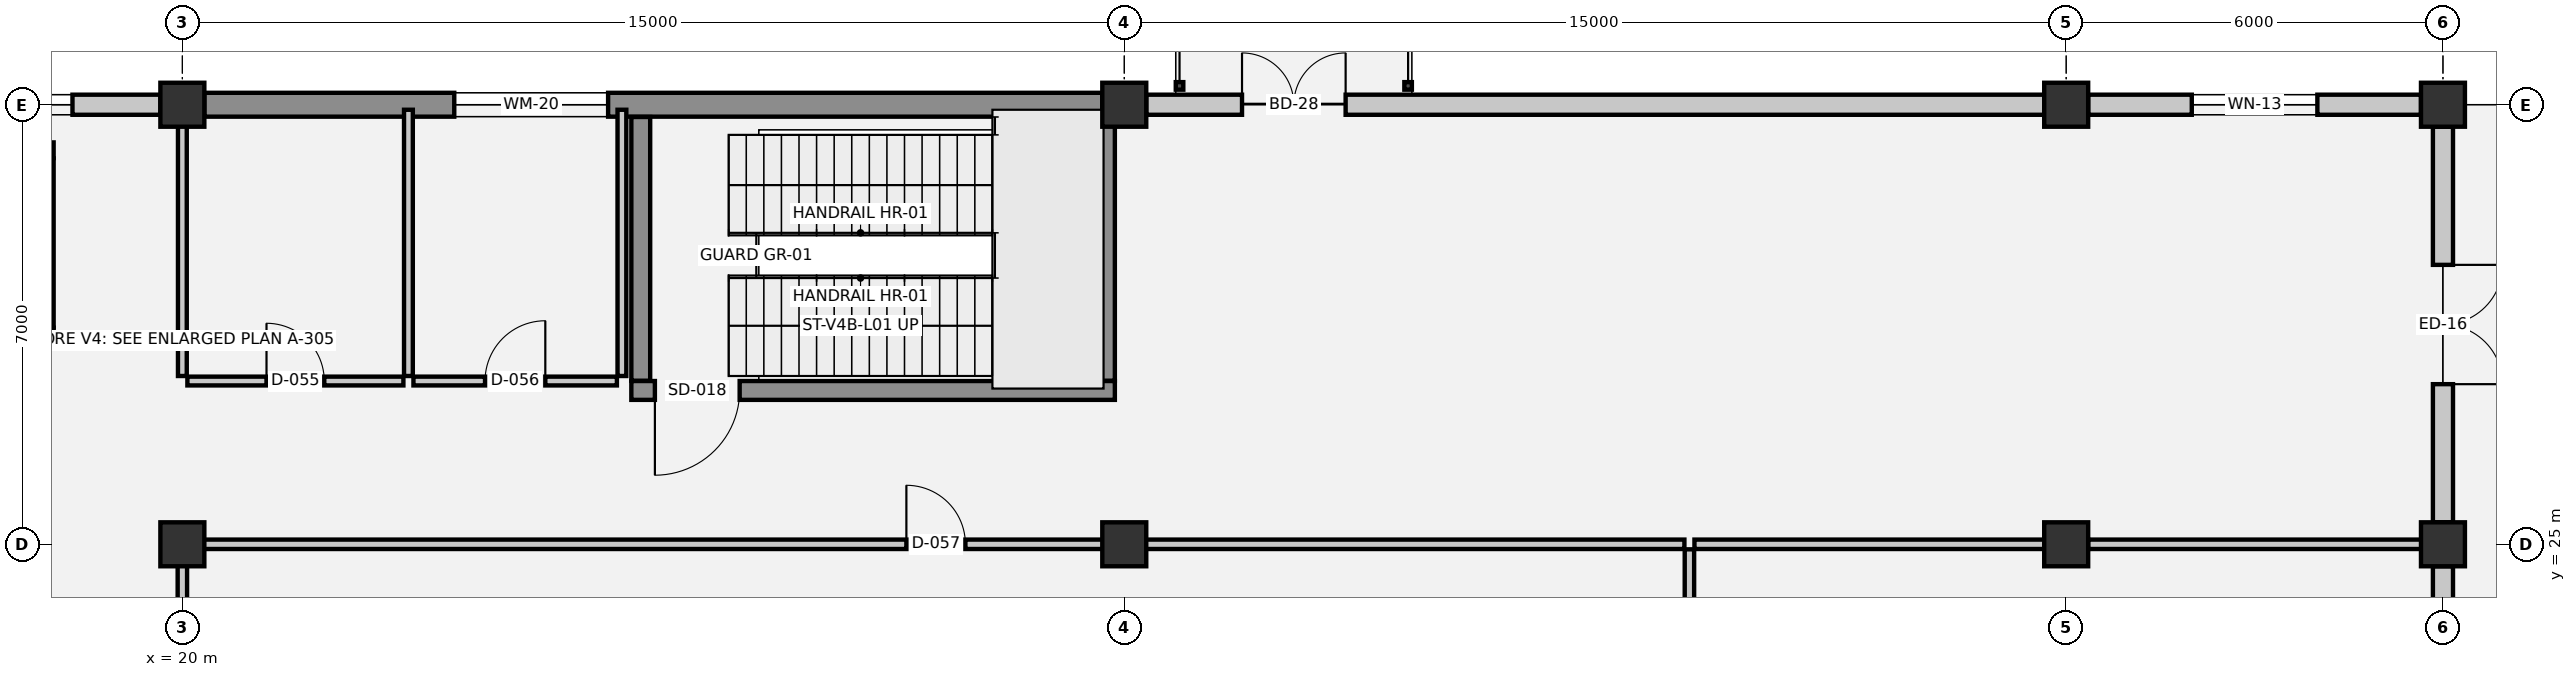
"""IFC4 building model, lengths in metres.
Left out: names, types, materials, properties, quantities, classifications, styles, units other than length and angle.
Written with IfcOpenShell. Run it as: python <this file> out.ifc"""

import sys

from ifc_helpers import new_model, si_unit, direction, frame, frame_2d, origin, origin_2d, place, context, subcontext, project, spatial, rectangle, extrude, element, fill, save


model = new_model("IFC4")
c1 = context("Model", 3, precision=1e-05, world=origin(), true_north=direction((0.0, 1.0)))
c2 = subcontext(c1, "Body", "Model", "MODEL_VIEW")
j1 = project(units=[si_unit("LENGTHUNIT", "METRE"), si_unit("PLANEANGLEUNIT", "RADIAN")], contexts=[c1])
p1 = place(None, origin())
s1 = spatial("IfcSite", under=j1, at=p1, CompositionType="ELEMENT")
p2 = place(p1, origin())
s2 = spatial("IfcBuilding", under=s1, at=p2, CompositionType="ELEMENT")
p3 = place(p2, origin())
s3 = spatial("IfcBuildingStorey", under=s2, at=p3, CompositionType="ELEMENT", Elevation=0.0)
for number, where, z_axis, x_axis in (
    (1, (20.0, 25.0, 0.0), (0.0, 0.0, 1.0), (1.0, 0.0, 0.0)),
    (2, (20.0, 32.0, 0.0), (0.0, 0.0, 1.0), (1.0, 0.0, 0.0)),
    (3, (35.0, 25.0, 0.0), (0.0, 0.0, 1.0), (1.0, 0.0, 0.0)),
    (4, (35.0, 32.0, 0.0), (0.0, 0.0, 1.0), (1.0, 0.0, 0.0)),
    (5, (50.0, 25.0, 0.0), (0.0, 0.0, 1.0), (1.0, 0.0, 0.0)),
    (6, (50.0, 32.0, 0.0), (0.0, 0.0, 1.0), (1.0, 0.0, 0.0)),
    (7, (56.0, 25.0, 0.0), (0.0, 0.0, 1.0), (1.0, 0.0, 0.0)),
    (8, (56.0, 32.0, 0.0), (0.0, 0.0, 1.0), (1.0, 0.0, 0.0)),
):
    element("IfcColumn", number, at=place(p3, frame(where, z_axis=z_axis, x_axis=x_axis)), inside=s3, PredefinedType="COLUMN", context=c2, shape_type="SweptSolid", body=[
        extrude(rectangle(XDim=0.7, YDim=0.7, at=origin_2d()), origin(), (0.0, 0.0, 1.0), 5.4),
    ])
p4 = place(p3, frame((14.85, 32.0, 0.0), z_axis=(0.0, 0.0, 1.0), x_axis=(1.0, 0.0, 0.0)))
e9 = element("IfcWall", 9, at=p4, inside=s3, PredefinedType="SOLIDWALL", context=c2, shape_type="SweptSolid", body=[
    extrude(rectangle(XDim=4.8, YDim=0.32, at=frame_2d((2.4, 0.0))), origin(), (0.0, 0.0, 1.0), 4.16),
])
p5 = place(p4, frame((1.4, 0.0, 0.9)))
e10 = element("IfcOpeningElement", 10, at=p5, cuts=e9, PredefinedType="OPENING", context=c2, shape_type="SweptSolid", body=[
    extrude(rectangle(XDim=2.0, YDim=2.2, at=frame_2d((1.0, 1.1))), frame((0.0, 0.17, 0.0), z_axis=(0.0, -1.0, 0.0), x_axis=(1.0, 0.0, 0.0)), (0.0, 0.0, 1.0), 0.34),
])
p6 = place(p3, frame((20.35, 32.0, 0.0), z_axis=(0.0, 0.0, 1.0), x_axis=(1.0, 0.0, 0.0)))
e11 = element("IfcWall", 11, at=p6, inside=s3, PredefinedType="STANDARD", context=c2, shape_type="SweptSolid", body=[
    extrude(rectangle(XDim=14.3, YDim=0.38, at=frame_2d((7.15, 0.0))), origin(), (0.0, 0.0, 1.0), 4.16),
])
p7 = place(p6, frame((3.98, 0.0, 0.95)))
e12 = element("IfcOpeningElement", 12, at=p7, cuts=e11, PredefinedType="OPENING", context=c2, shape_type="SweptSolid", body=[
    extrude(rectangle(XDim=2.45, YDim=1.95, at=frame_2d((1.225, 0.975))), frame((0.0, 0.2, 0.0), z_axis=(0.0, -1.0, 0.0), x_axis=(1.0, 0.0, 0.0)), (0.0, 0.0, 1.0), 0.4),
])
p8 = place(p3, frame((35.35, 32.0, 0.0), z_axis=(0.0, 0.0, 1.0), x_axis=(1.0, 0.0, 0.0)))
e13 = element("IfcWall", 13, at=p8, inside=s3, PredefinedType="SOLIDWALL", context=c2, shape_type="SweptSolid", body=[
    extrude(rectangle(XDim=14.3, YDim=0.32, at=frame_2d((7.15, 0.0))), origin(), (0.0, 0.0, 1.0), 4.16),
])
p9 = place(p8, frame((1.525, 0.0, 0.0)))
e14 = element("IfcOpeningElement", 14, at=p9, cuts=e13, PredefinedType="OPENING", context=c2, shape_type="SweptSolid", body=[
    extrude(rectangle(XDim=1.65, YDim=2.2, at=frame_2d((0.825, 1.1))), frame((0.0, 0.17, 0.0), z_axis=(0.0, -1.0, 0.0), x_axis=(1.0, 0.0, 0.0)), (0.0, 0.0, 1.0), 0.34),
])
p10 = place(p3, frame((50.35, 32.0, 0.0), z_axis=(0.0, 0.0, 1.0), x_axis=(1.0, 0.0, 0.0)))
e15 = element("IfcWall", 15, at=p10, inside=s3, PredefinedType="SOLIDWALL", context=c2, shape_type="SweptSolid", body=[
    extrude(rectangle(XDim=5.3, YDim=0.32, at=frame_2d((2.65, 0.0))), origin(), (0.0, 0.0, 1.0), 4.16),
])
p11 = place(p10, frame((1.65, 0.0, 0.9)))
e16 = element("IfcOpeningElement", 16, at=p11, cuts=e15, PredefinedType="OPENING", context=c2, shape_type="SweptSolid", body=[
    extrude(rectangle(XDim=2.0, YDim=2.2, at=frame_2d((1.0, 1.1))), frame((0.0, 0.17, 0.0), z_axis=(0.0, -1.0, 0.0), x_axis=(1.0, 0.0, 0.0)), (0.0, 0.0, 1.0), 0.34),
])
p12 = place(p3, frame((56.0, 31.65, 0.0), z_axis=(0.0, 0.0, 1.0), x_axis=(0.0, -1.0, 0.0)))
e17 = element("IfcWall", 17, at=p12, inside=s3, PredefinedType="SOLIDWALL", context=c2, shape_type="SweptSolid", body=[
    extrude(rectangle(XDim=6.3, YDim=0.32, at=frame_2d((3.15, 0.0))), origin(), (0.0, 0.0, 1.0), 4.16),
])
p13 = place(p12, frame((2.2, 0.0, 0.0)))
e18 = element("IfcOpeningElement", 18, at=p13, cuts=e17, PredefinedType="OPENING", context=c2, shape_type="SweptSolid", body=[
    extrude(rectangle(XDim=1.9, YDim=2.25, at=frame_2d((0.95, 1.125))), frame((0.0, 0.17, 0.0), z_axis=(0.0, -1.0, 0.0), x_axis=(1.0, 0.0, 0.0)), (0.0, 0.0, 1.0), 0.34),
])
p14 = place(p3, frame((56.0, 24.65, 0.0), z_axis=(0.0, 0.0, 1.0), x_axis=(0.0, -1.0, 0.0)))
e19 = element("IfcWall", 19, at=p14, inside=s3, PredefinedType="SOLIDWALL", context=c2, shape_type="SweptSolid", body=[
    extrude(rectangle(XDim=7.3, YDim=0.32, at=frame_2d((3.65, 0.0))), origin(), (0.0, 0.0, 1.0), 4.16),
])
p15 = place(p14, frame((2.45, 0.0, 0.0)))
e20 = element("IfcOpeningElement", 20, at=p15, cuts=e19, PredefinedType="OPENING", context=c2, shape_type="SweptSolid", body=[
    extrude(rectangle(XDim=2.4, YDim=2.4, at=frame_2d((1.2, 1.2))), frame((0.0, 0.17, 0.0), z_axis=(0.0, -1.0, 0.0), x_axis=(1.0, 0.0, 0.0)), (0.0, 0.0, 1.0), 0.34),
])
p16 = place(p3, frame((15.05, 28.325, 0.0), z_axis=(0.0, 0.0, 1.0), x_axis=(1.0, 0.0, 0.0)))
e21 = element("IfcWall", 21, at=p16, inside=s3, PredefinedType="SHEAR", context=c2, shape_type="SweptSolid", body=[
    extrude(rectangle(XDim=2.9, YDim=0.25, at=frame_2d((1.45, 0.0))), origin(), (0.0, 0.0, 1.0), 5.4),
])
p17 = place(p16, frame((0.9, 0.0, 0.0)))
e22 = element("IfcOpeningElement", 22, at=p17, cuts=e21, PredefinedType="OPENING", context=c2, shape_type="SweptSolid", body=[
    extrude(rectangle(XDim=1.1, YDim=2.15, at=frame_2d((0.55, 1.075))), frame((0.0, 0.135, 0.0), z_axis=(0.0, -1.0, 0.0), x_axis=(1.0, 0.0, 0.0)), (0.0, 0.0, 1.0), 0.27),
])
p18 = place(p3, frame((17.95, 31.275, 0.0), z_axis=(0.0, 0.0, 1.0), x_axis=(-1.0, 0.0, 0.0)))
e23 = element("IfcWall", 23, at=p18, inside=s3, PredefinedType="SHEAR", context=c2, shape_type="SweptSolid", body=[
    extrude(rectangle(XDim=2.9, YDim=0.25, at=frame_2d((1.45, 0.0))), origin(), (0.0, 0.0, 1.0), 5.4),
])
p19 = place(p3, frame((17.825, 28.455, 0.0), z_axis=(0.0, 0.0, 1.0), x_axis=(0.0, 1.0, 0.0)))
e24 = element("IfcWall", 24, at=p19, inside=s3, PredefinedType="SHEAR", context=c2, shape_type="SweptSolid", body=[
    extrude(rectangle(XDim=2.69, YDim=0.25, at=frame_2d((1.345, 0.0))), origin(), (0.0, 0.0, 1.0), 5.4),
])
p20 = place(p3, frame((34.85, 27.45, 0.0), z_axis=(0.0, 0.0, 1.0), x_axis=(-1.0, 0.0, 0.0)))
e25 = element("IfcWall", 25, at=p20, inside=s3, PredefinedType="SHEAR", context=c2, shape_type="SweptSolid", body=[
    extrude(rectangle(XDim=7.7, YDim=0.3, at=frame_2d((3.85, 0.0))), origin(), (0.0, 0.0, 1.0), 5.14),
])
p21 = place(p20, frame((5.975, 0.0, 0.0)))
e26 = element("IfcOpeningElement", 26, at=p21, cuts=e25, PredefinedType="OPENING", context=c2, shape_type="SweptSolid", body=[
    extrude(rectangle(XDim=1.35, YDim=2.2, at=frame_2d((0.675, 1.1))), frame((0.0, 0.16, 0.0), z_axis=(0.0, -1.0, 0.0), x_axis=(1.0, 0.0, 0.0)), (0.0, 0.0, 1.0), 0.32),
])
for number, where, z_axis, x_axis in (
    (27, (27.3, 31.805, 0.0), (0.0, 0.0, 1.0), (0.0, -1.0, 0.0)),
    (28, (34.7, 27.605, 0.0), (0.0, 0.0, 1.0), (0.0, 1.0, 0.0)),
):
    element("IfcWall", number, at=place(p3, frame(where, z_axis=z_axis, x_axis=x_axis)), inside=s3, PredefinedType="SHEAR", context=c2, shape_type="SweptSolid", body=[
        extrude(rectangle(XDim=4.2, YDim=0.3, at=frame_2d((2.1, 0.0))), origin(), (0.0, 0.0, 1.0), 5.14),
    ])
p22 = place(p3, frame((20.08, 25.0, 0.0), z_axis=(0.0, 0.0, 1.0), x_axis=(1.0, 0.0, 0.0)))
e29 = element("IfcWall", 29, at=p22, inside=s3, PredefinedType="PARTITIONING", context=c2, shape_type="SweptSolid", body=[
    extrude(rectangle(XDim=23.84, YDim=0.15, at=frame_2d((11.92, 0.0))), origin(), (0.0, 0.0, 1.0), 4.18),
])
p23 = place(p22, frame((11.45, 0.0, 0.0)))
e30 = element("IfcOpeningElement", 30, at=p23, cuts=e29, PredefinedType="OPENING", context=c2, shape_type="SweptSolid", body=[
    extrude(rectangle(XDim=0.94, YDim=2.15, at=frame_2d((0.47, 1.075))), frame((0.0, 0.085, 0.0), z_axis=(0.0, -1.0, 0.0), x_axis=(1.0, 0.0, 0.0)), (0.0, 0.0, 1.0), 0.17),
])
p24 = place(p3, frame((44.08, 25.0, 0.0), z_axis=(0.0, 0.0, 1.0), x_axis=(1.0, 0.0, 0.0)))
e31 = element("IfcWall", 31, at=p24, inside=s3, PredefinedType="PARTITIONING", context=c2, shape_type="SweptSolid", body=[
    extrude(rectangle(XDim=6.27, YDim=0.15, at=frame_2d((3.135, 0.0))), origin(), (0.0, 0.0, 1.0), 4.18),
])
p25 = place(p3, frame((50.35, 25.0, 0.0), z_axis=(0.0, 0.0, 1.0), x_axis=(1.0, 0.0, 0.0)))
e32 = element("IfcWall", 32, at=p25, inside=s3, PredefinedType="PARTITIONING", context=c2, shape_type="SweptSolid", body=[
    extrude(rectangle(XDim=5.57, YDim=0.15, at=frame_2d((2.785, 0.0))), origin(), (0.0, 0.0, 1.0), 4.43),
])
p26 = place(p3, frame((20.08, 27.6, 0.0), z_axis=(0.0, 0.0, 1.0), x_axis=(1.0, 0.0, 0.0)))
e33 = element("IfcWall", 33, at=p26, inside=s3, PredefinedType="PLUMBINGWALL", context=c2, shape_type="SweptSolid", body=[
    extrude(rectangle(XDim=3.44, YDim=0.14, at=frame_2d((1.72, 0.0))), origin(), (0.0, 0.0, 1.0), 5.04),
])
p27 = place(p26, frame((1.26, 0.0, 0.0)))
e34 = element("IfcOpeningElement", 34, at=p27, cuts=e33, PredefinedType="OPENING", context=c2, shape_type="SweptSolid", body=[
    extrude(rectangle(XDim=0.92, YDim=2.1, at=frame_2d((0.46, 1.05))), frame((0.0, 0.08, 0.0), z_axis=(0.0, -1.0, 0.0), x_axis=(1.0, 0.0, 0.0)), (0.0, 0.0, 1.0), 0.16),
])
p28 = place(p3, frame((23.68, 27.6, 0.0), z_axis=(0.0, 0.0, 1.0), x_axis=(1.0, 0.0, 0.0)))
e35 = element("IfcWall", 35, at=p28, inside=s3, PredefinedType="PLUMBINGWALL", context=c2, shape_type="SweptSolid", body=[
    extrude(rectangle(XDim=3.24, YDim=0.14, at=frame_2d((1.62, 0.0))), origin(), (0.0, 0.0, 1.0), 5.04),
])
p29 = place(p28, frame((1.14, 0.0, 0.0)))
e36 = element("IfcOpeningElement", 36, at=p29, cuts=e35, PredefinedType="OPENING", context=c2, shape_type="SweptSolid", body=[
    extrude(rectangle(XDim=0.96, YDim=2.1, at=frame_2d((0.48, 1.05))), frame((0.0, 0.08, 0.0), z_axis=(0.0, -1.0, 0.0), x_axis=(1.0, 0.0, 0.0)), (0.0, 0.0, 1.0), 0.16),
])
p30 = place(p3, frame((20.0, 16.65, 0.0), z_axis=(0.0, 0.0, 1.0), x_axis=(0.0, 1.0, 0.0)))
e37 = element("IfcWall", 37, at=p30, inside=s3, PredefinedType="PARTITIONING", context=c2, shape_type="SweptSolid", body=[
    extrude(rectangle(XDim=8.27, YDim=0.15, at=frame_2d((4.135, 0.0))), origin(), (0.0, 0.0, 1.0), 4.43),
])
p31 = place(p3, frame((20.0, 27.68, 0.0), z_axis=(0.0, 0.0, 1.0), x_axis=(0.0, 1.0, 0.0)))
e38 = element("IfcWall", 38, at=p31, inside=s3, PredefinedType="PLUMBINGWALL", context=c2, shape_type="SweptSolid", body=[
    extrude(rectangle(XDim=4.24, YDim=0.14, at=frame_2d((2.12, 0.0))), origin(), (0.0, 0.0, 1.0), 4.58),
])
for number, where, z_axis, x_axis in (
    (39, (23.6, 27.68, 0.0), (0.0, 0.0, 1.0), (0.0, 1.0, 0.0)),
    (40, (27.0, 27.68, 0.0), (0.0, 0.0, 1.0), (0.0, 1.0, 0.0)),
):
    element("IfcWall", number, at=place(p3, frame(where, z_axis=z_axis, x_axis=x_axis)), inside=s3, PredefinedType="PLUMBINGWALL", context=c2, shape_type="SweptSolid", body=[
        extrude(rectangle(XDim=4.24, YDim=0.14, at=frame_2d((2.12, 0.0))), origin(), (0.0, 0.0, 1.0), 5.04),
    ])
p32 = place(p3, frame((44.0, 10.08, 0.0), z_axis=(0.0, 0.0, 1.0), x_axis=(0.0, 1.0, 0.0)))
e41 = element("IfcWall", 41, at=p32, inside=s3, PredefinedType="PARTITIONING", context=c2, shape_type="SweptSolid", body=[
    extrude(rectangle(XDim=14.84, YDim=0.15, at=frame_2d((7.42, 0.0))), origin(), (0.0, 0.0, 1.0), 5.04),
])
p33 = place(p32, frame((6.91, 0.0, 0.0)))
e42 = element("IfcOpeningElement", 42, at=p33, cuts=e41, PredefinedType="OPENING", context=c2, shape_type="SweptSolid", body=[
    extrude(rectangle(XDim=1.02, YDim=2.15, at=frame_2d((0.51, 1.075))), frame((0.0, 0.085, 0.0), z_axis=(0.0, -1.0, 0.0), x_axis=(1.0, 0.0, 0.0)), (0.0, 0.0, 1.0), 0.17),
])
p34 = place(p5, origin())
e43 = element("IfcWindow", 43, at=p34, inside=s3, PartitioningType="SINGLE_PANEL", PredefinedType="WINDOW", context=c2, shape_type="SweptSolid", body=[
    extrude(rectangle(XDim=2.0, YDim=2.2, at=frame_2d((1.0, 1.1))), frame((0.0, 0.03, 0.0), z_axis=(0.0, -1.0, 0.0), x_axis=(1.0, 0.0, 0.0)), (0.0, 0.0, 1.0), 0.06),
])
fill(e10, e43)
p35 = place(p9, origin())
e44 = element("IfcDoor", 44, at=p35, inside=s3, OperationType="DOUBLE_DOOR_SINGLE_SWING", PredefinedType="DOOR", context=c2, shape_type="SweptSolid", body=[
    extrude(rectangle(XDim=1.65, YDim=2.2, at=frame_2d((0.825, 1.1))), frame((0.0, 0.025, 0.0), z_axis=(0.0, -1.0, 0.0), x_axis=(1.0, 0.0, 0.0)), (0.0, 0.0, 1.0), 0.05),
])
fill(e14, e44)
p36 = place(p11, origin())
e45 = element("IfcWindow", 45, at=p36, inside=s3, PartitioningType="SINGLE_PANEL", PredefinedType="WINDOW", context=c2, shape_type="SweptSolid", body=[
    extrude(rectangle(XDim=2.0, YDim=2.2, at=frame_2d((1.0, 1.1))), frame((0.0, 0.03, 0.0), z_axis=(0.0, -1.0, 0.0), x_axis=(1.0, 0.0, 0.0)), (0.0, 0.0, 1.0), 0.06),
])
fill(e16, e45)
p37 = place(p13, origin())
e46 = element("IfcDoor", 46, at=p37, inside=s3, OperationType="DOUBLE_DOOR_SINGLE_SWING", PredefinedType="DOOR", context=c2, shape_type="SweptSolid", body=[
    extrude(rectangle(XDim=1.9, YDim=2.25, at=frame_2d((0.95, 1.125))), frame((0.0, 0.025, 0.0), z_axis=(0.0, -1.0, 0.0), x_axis=(1.0, 0.0, 0.0)), (0.0, 0.0, 1.0), 0.05),
])
fill(e18, e46)
p38 = place(p21, origin())
e47 = element("IfcDoor", 47, at=p38, inside=s3, OperationType="SINGLE_SWING_RIGHT", PredefinedType="DOOR", context=c2, shape_type="SweptSolid", body=[
    extrude(rectangle(XDim=1.35, YDim=2.2, at=frame_2d((0.675, 1.1))), frame((0.0, 0.025, 0.0), z_axis=(0.0, -1.0, 0.0), x_axis=(1.0, 0.0, 0.0)), (0.0, 0.0, 1.0), 0.05),
])
fill(e26, e47)
p39 = place(p27, origin())
e48 = element("IfcDoor", 48, at=p39, inside=s3, OperationType="SINGLE_SWING_LEFT", PredefinedType="DOOR", context=c2, shape_type="SweptSolid", body=[
    extrude(rectangle(XDim=0.92, YDim=2.1, at=frame_2d((0.46, 1.05))), frame((0.0, 0.025, 0.0), z_axis=(0.0, -1.0, 0.0), x_axis=(1.0, 0.0, 0.0)), (0.0, 0.0, 1.0), 0.05),
])
fill(e34, e48)
p40 = place(p29, origin())
e49 = element("IfcDoor", 49, at=p40, inside=s3, OperationType="SINGLE_SWING_RIGHT", PredefinedType="DOOR", context=c2, shape_type="SweptSolid", body=[
    extrude(rectangle(XDim=0.96, YDim=2.1, at=frame_2d((0.48, 1.05))), frame((0.0, 0.025, 0.0), z_axis=(0.0, -1.0, 0.0), x_axis=(1.0, 0.0, 0.0)), (0.0, 0.0, 1.0), 0.05),
])
fill(e36, e49)
p41 = place(p23, origin())
e50 = element("IfcDoor", 50, at=p41, inside=s3, OperationType="SINGLE_SWING_LEFT", PredefinedType="DOOR", context=c2, shape_type="SweptSolid", body=[
    extrude(rectangle(XDim=0.94, YDim=2.15, at=frame_2d((0.47, 1.075))), frame((0.0, 0.025, 0.0), z_axis=(0.0, -1.0, 0.0), x_axis=(1.0, 0.0, 0.0)), (0.0, 0.0, 1.0), 0.05),
])
fill(e30, e50)
p42 = place(p7, origin())
e51 = element("IfcWindow", 51, at=p42, inside=s3, PartitioningType="SINGLE_PANEL", PredefinedType="WINDOW", context=c2, shape_type="SweptSolid", body=[
    extrude(rectangle(XDim=2.45, YDim=1.95, at=frame_2d((1.225, 0.975))), frame((0.0, 0.03, 0.0), z_axis=(0.0, -1.0, 0.0), x_axis=(1.0, 0.0, 0.0)), (0.0, 0.0, 1.0), 0.06),
])
fill(e12, e51)
save(model, sys.argv[1])
